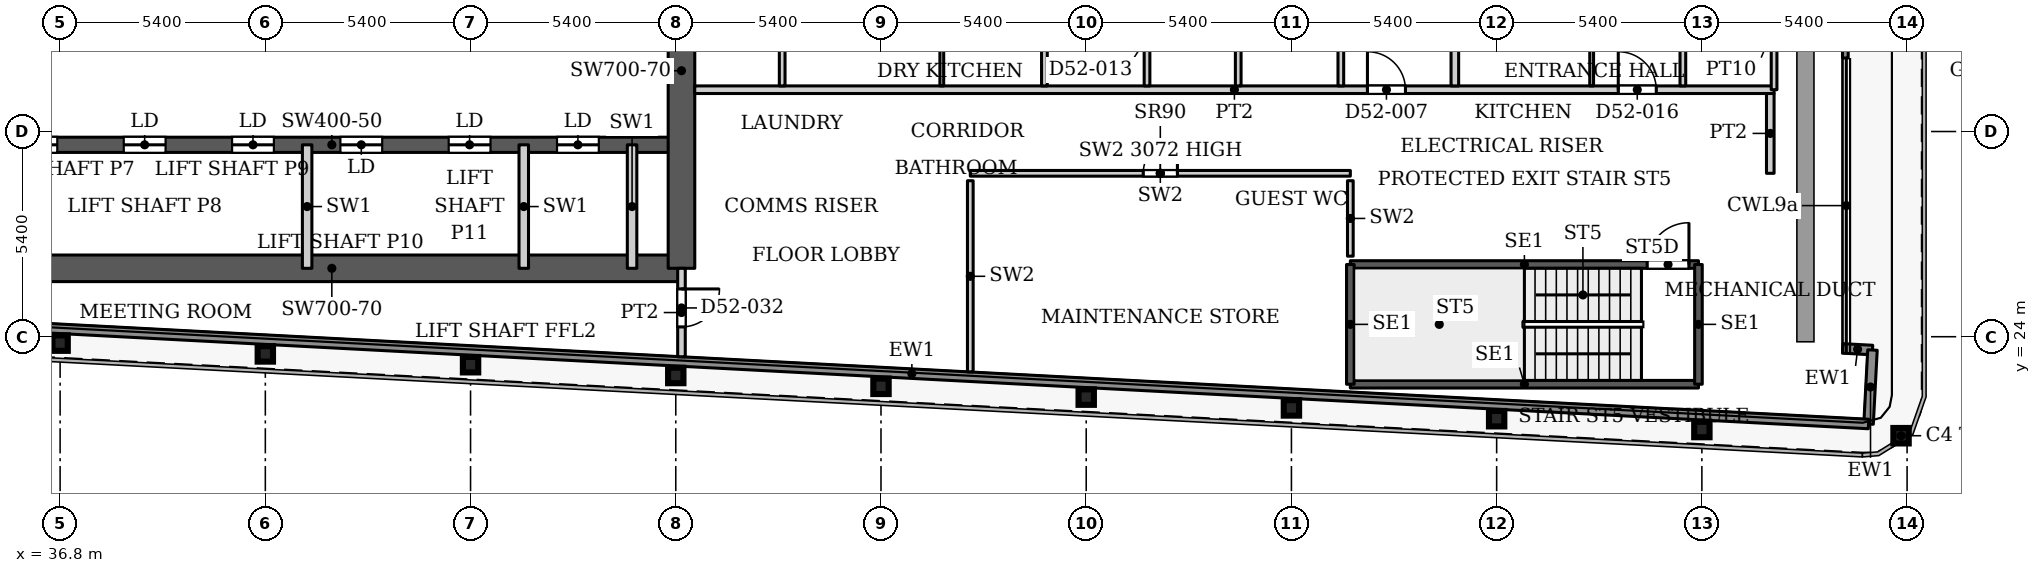
"""IFC4 building model, lengths in metres.
Left out: names, types, materials, properties, quantities, classifications, styles, units other than length and angle.
Written with IfcOpenShell. Run it as: python <this file> out.ifc"""

import sys

from ifc_helpers import new_model, si_unit, direction, frame, frame_2d, origin, origin_2d, place, context, subcontext, project, spatial, rectangle, i_section, extrude, source, transform, mapped, element, fill, save


model = new_model("IFC4")
c1 = context("Model", 3, precision=1e-05, world=origin(), true_north=direction((0.0, 1.0)))
c2 = subcontext(c1, "Body", "Model", "MODEL_VIEW")
j1 = project(units=[si_unit("LENGTHUNIT", "METRE"), si_unit("PLANEANGLEUNIT", "RADIAN")], contexts=[c1])
p1 = place(None, origin())
s1 = spatial("IfcSite", under=j1, at=p1, CompositionType="ELEMENT")
p2 = place(p1, origin())
s2 = spatial("IfcBuilding", under=s1, at=p2, CompositionType="ELEMENT")
p3 = place(p2, frame((0.0, 0.0, 227.9)))
s3 = spatial("IfcBuildingStorey", under=s2, at=p3, CompositionType="ELEMENT", Elevation=227.9)
for number, where, z_axis, x_axis in (
    (1, (85.241, 21.395, 0.0), (0.0, 0.0, 1.0), (1.0, 0.0, 0.0)),
    (2, (80.0, 21.558, 0.0), (0.0, 0.0, 1.0), (1.0, 0.0, 0.0)),
    (3, (74.6, 21.843, 0.0), (0.0, 0.0, 1.0), (1.0, 0.0, 0.0)),
    (4, (69.2, 22.127, 0.0), (0.0, 0.0, 1.0), (1.0, 0.0, 0.0)),
    (5, (63.8, 22.411, 0.0), (0.0, 0.0, 1.0), (1.0, 0.0, 0.0)),
    (6, (58.4, 22.695, 0.0), (0.0, 0.0, 1.0), (1.0, 0.0, 0.0)),
    (7, (53.0, 22.98, 0.0), (0.0, 0.0, 1.0), (1.0, 0.0, 0.0)),
    (8, (47.6, 23.264, 0.0), (0.0, 0.0, 1.0), (1.0, 0.0, 0.0)),
    (9, (42.2, 23.548, 0.0), (0.0, 0.0, 1.0), (1.0, 0.0, 0.0)),
    (10, (36.8, 23.832, 0.0), (0.0, 0.0, 1.0), (1.0, 0.0, 0.0)),
):
    element("IfcColumn", number, at=place(p3, frame(where, z_axis=z_axis, x_axis=x_axis)), inside=s3, PredefinedType="COLUMN", context=c2, shape_type="SweptSolid", body=[
        extrude(i_section(OverallWidth=0.404, OverallDepth=0.407, WebThickness=0.027, FlangeThickness=0.044, FilletRadius=0.012, at=origin_2d()), origin(), (0.0, 0.0, 1.0), 3.9),
    ])
p4 = place(p3, frame((34.75, 25.8, 0.0), z_axis=(0.0, 0.0, 1.0), x_axis=(1.0, 0.0, 0.0)))
e11 = element("IfcWall", 11, at=p4, inside=s3, PredefinedType="SHEAR", context=c2, shape_type="SweptSolid", body=[
    extrude(rectangle(XDim=18.4, YDim=0.7, at=frame_2d((9.2, 0.0))), origin(), (0.0, 0.0, 1.0), 3.9),
])
p5 = place(p3, frame((34.75, 29.05, 0.0), z_axis=(0.0, 0.0, 1.0), x_axis=(1.0, 0.0, 0.0)))
e12 = element("IfcWall", 12, at=p5, inside=s3, PredefinedType="SHEAR", context=c2, shape_type="SweptSolid", body=[
    extrude(rectangle(XDim=18.4, YDim=0.4, at=frame_2d((9.2, 0.0))), origin(), (0.0, 0.0, 1.0), 3.9),
])
p6 = place(p5, frame((0.875, 0.0, 0.0)))
e13 = element("IfcOpeningElement", 13, at=p6, cuts=e12, PredefinedType="OPENING", context=c2, shape_type="SweptSolid", body=[
    extrude(rectangle(XDim=1.1, YDim=2.2, at=frame_2d((0.55, 1.1))), frame((0.0, 0.21, 0.0), z_axis=(0.0, -1.0, 0.0), x_axis=(1.0, 0.0, 0.0)), (0.0, 0.0, 1.0), 0.42),
])
p7 = place(p5, frame((3.725, 0.0, 0.0)))
e14 = element("IfcOpeningElement", 14, at=p7, cuts=e12, PredefinedType="OPENING", context=c2, shape_type="SweptSolid", body=[
    extrude(rectangle(XDim=1.1, YDim=2.2, at=frame_2d((0.55, 1.1))), frame((0.0, 0.21, 0.0), z_axis=(0.0, -1.0, 0.0), x_axis=(1.0, 0.0, 0.0)), (0.0, 0.0, 1.0), 0.42),
])
p8 = place(p5, frame((6.575, 0.0, 0.0)))
e15 = element("IfcOpeningElement", 15, at=p8, cuts=e12, PredefinedType="OPENING", context=c2, shape_type="SweptSolid", body=[
    extrude(rectangle(XDim=1.1, YDim=2.2, at=frame_2d((0.55, 1.1))), frame((0.0, 0.21, 0.0), z_axis=(0.0, -1.0, 0.0), x_axis=(1.0, 0.0, 0.0)), (0.0, 0.0, 1.0), 0.42),
])
p9 = place(p5, frame((9.425, 0.0, 0.0)))
e16 = element("IfcOpeningElement", 16, at=p9, cuts=e12, PredefinedType="OPENING", context=c2, shape_type="SweptSolid", body=[
    extrude(rectangle(XDim=1.1, YDim=2.2, at=frame_2d((0.55, 1.1))), frame((0.0, 0.21, 0.0), z_axis=(0.0, -1.0, 0.0), x_axis=(1.0, 0.0, 0.0)), (0.0, 0.0, 1.0), 0.42),
])
p10 = place(p5, frame((12.275, 0.0, 0.0)))
e17 = element("IfcOpeningElement", 17, at=p10, cuts=e12, PredefinedType="OPENING", context=c2, shape_type="SweptSolid", body=[
    extrude(rectangle(XDim=1.1, YDim=2.2, at=frame_2d((0.55, 1.1))), frame((0.0, 0.21, 0.0), z_axis=(0.0, -1.0, 0.0), x_axis=(1.0, 0.0, 0.0)), (0.0, 0.0, 1.0), 0.42),
])
p11 = place(p5, frame((15.125, 0.0, 0.0)))
e18 = element("IfcOpeningElement", 18, at=p11, cuts=e12, PredefinedType="OPENING", context=c2, shape_type="SweptSolid", body=[
    extrude(rectangle(XDim=1.1, YDim=2.2, at=frame_2d((0.55, 1.1))), frame((0.0, 0.21, 0.0), z_axis=(0.0, -1.0, 0.0), x_axis=(1.0, 0.0, 0.0)), (0.0, 0.0, 1.0), 0.42),
])
p12 = place(p3, frame((53.15, 25.8, 0.0), z_axis=(0.0, 0.0, 1.0), x_axis=(0.0, 1.0, 0.0)))
e19 = element("IfcWall", 19, at=p12, inside=s3, PredefinedType="SHEAR", context=c2, shape_type="SweptSolid", body=[
    extrude(rectangle(XDim=10.4, YDim=0.7, at=frame_2d((5.2, 0.0))), origin(), (0.0, 0.0, 1.0), 3.9),
])
p13 = place(p3, frame((83.775, 33.733, 0.0), z_axis=(0.0, 0.0, 1.0), x_axis=(0.0, -1.0, 0.0)))
e20 = element("IfcWall", 20, at=p13, inside=s3, PredefinedType="SOLIDWALL", context=c2, shape_type="SweptSolid", body=[
    extrude(rectangle(XDim=2.399, YDim=0.15, at=frame_2d((1.199, 0.0))), origin(), (0.0, 0.0, 1.0), 3.75),
])
p14 = place(p13, frame((0.3, 0.0, 0.0)))
e21 = element("IfcOpeningElement", 21, at=p14, cuts=e20, PredefinedType="OPENING", context=c2, shape_type="SweptSolid", body=[
    extrude(rectangle(XDim=1.8, YDim=2.4, at=frame_2d((0.9, 1.2))), frame((0.0, 0.085, 0.0), z_axis=(0.0, -1.0, 0.0), x_axis=(1.0, 0.0, 0.0)), (0.0, 0.0, 1.0), 0.17),
])
p15 = place(p3, frame((83.707, 23.692, 0.0), z_axis=(0.0, 0.0, 1.0), x_axis=(0.998561284263, -0.053622398031, 0.0)))
e22 = element("IfcWall", 22, at=p15, inside=s3, PredefinedType="SOLIDWALL", context=c2, shape_type="SweptSolid", body=[
    extrude(rectangle(XDim=0.783, YDim=0.25, at=frame_2d((0.392, 0.0))), origin(), (0.0, 0.0, 1.0), 3.75),
])
p16 = place(p3, frame((84.489, 23.65, 0.0), z_axis=(0.0, 0.0, 1.0), x_axis=(-0.052841433274, -0.998602915542, 0.0)))
e23 = element("IfcWall", 23, at=p16, inside=s3, PredefinedType="SOLIDWALL", context=c2, shape_type="SweptSolid", body=[
    extrude(rectangle(XDim=1.95, YDim=0.25, at=frame_2d((0.975, 0.0))), origin(), (0.0, 0.0, 1.0), 3.75),
])
p17 = place(p3, frame((84.386, 21.703, 0.0), z_axis=(0.0, 0.0, 1.0), x_axis=(-0.998617508267, 0.05256493302, 0.0)))
e24 = element("IfcWall", 24, at=p17, inside=s3, PredefinedType="SOLIDWALL", context=c2, shape_type="SweptSolid", body=[
    extrude(rectangle(XDim=50.417, YDim=0.25, at=frame_2d((25.208, 0.0))), origin(), (0.0, 0.0, 1.0), 3.75),
])
p18 = place(p3, frame((70.75, 22.75, 0.0), z_axis=(0.0, 0.0, 1.0), x_axis=(1.0, 0.0, 0.0)))
e25 = element("IfcWall", 25, at=p18, inside=s3, PredefinedType="SHEAR", context=c2, shape_type="SweptSolid", body=[
    extrude(rectangle(XDim=9.16, YDim=0.2, at=frame_2d((4.58, 0.0))), origin(), (0.0, 0.0, 1.0), 3.9),
])
p19 = place(p3, frame((70.75, 25.9, 0.0), z_axis=(0.0, 0.0, 1.0), x_axis=(1.0, 0.0, 0.0)))
e26 = element("IfcWall", 26, at=p19, inside=s3, PredefinedType="SHEAR", context=c2, shape_type="SweptSolid", body=[
    extrude(rectangle(XDim=9.16, YDim=0.2, at=frame_2d((4.58, 0.0))), origin(), (0.0, 0.0, 1.0), 3.9),
])
p20 = place(p19, frame((7.81, 0.0, 0.0)))
e27 = element("IfcOpeningElement", 27, at=p20, cuts=e26, PredefinedType="OPENING", context=c2, shape_type="SweptSolid", body=[
    extrude(rectangle(XDim=1.1, YDim=2.2, at=frame_2d((0.55, 1.1))), frame((0.0, 0.11, 0.0), z_axis=(0.0, -1.0, 0.0), x_axis=(1.0, 0.0, 0.0)), (0.0, 0.0, 1.0), 0.22),
])
for number, where, z_axis, x_axis in (
    (28, (70.75, 22.75, 0.0), (0.0, 0.0, 1.0), (0.0, 1.0, 0.0)),
    (29, (79.91, 22.75, 0.0), (0.0, 0.0, 1.0), (0.0, 1.0, 0.0)),
):
    element("IfcWall", number, at=place(p3, frame(where, z_axis=z_axis, x_axis=x_axis)), inside=s3, PredefinedType="SHEAR", context=c2, shape_type="SweptSolid", body=[
        extrude(rectangle(XDim=3.15, YDim=0.2, at=frame_2d((1.575, 0.0))), origin(), (0.0, 0.0, 1.0), 3.9),
    ])
for number, where, z_axis, x_axis in (
    (30, (43.3, 25.8, 0.0), (0.0, 0.0, 1.0), (0.0, 1.0, 0.0)),
    (31, (49.0, 25.8, 0.0), (0.0, 0.0, 1.0), (0.0, 1.0, 0.0)),
    (32, (51.85, 25.8, 0.0), (0.0, 0.0, 1.0), (0.0, 1.0, 0.0)),
):
    element("IfcWall", number, at=place(p3, frame(where, z_axis=z_axis, x_axis=x_axis)), inside=s3, PredefinedType="PARTITIONING", context=c2, shape_type="SweptSolid", body=[
        extrude(rectangle(XDim=3.25, YDim=0.25, at=frame_2d((1.625, 0.0))), origin(), (0.0, 0.0, 1.0), 3.9),
    ])
p21 = place(p3, frame((60.75, 28.3, 0.0), z_axis=(0.0, 0.0, 1.0), x_axis=(1.0, 0.0, 0.0)))
e33 = element("IfcWall", 33, at=p21, inside=s3, PredefinedType="PARTITIONING", context=c2, shape_type="SweptSolid", body=[
    extrude(rectangle(XDim=10.0, YDim=0.15, at=frame_2d((5.0, 0.0))), origin(), (0.0, 0.0, 1.0), 3.072),
])
p22 = place(p21, frame((4.55, 0.0, 0.0)))
e34 = element("IfcOpeningElement", 34, at=p22, cuts=e33, PredefinedType="OPENING", context=c2, shape_type="SweptSolid", body=[
    extrude(rectangle(XDim=0.9, YDim=2.2, at=frame_2d((0.45, 1.1))), frame((0.0, 0.085, 0.0), z_axis=(0.0, -1.0, 0.0), x_axis=(1.0, 0.0, 0.0)), (0.0, 0.0, 1.0), 0.17),
])
p23 = place(p3, frame((60.75, 23.075, 0.0), z_axis=(0.0, 0.0, 1.0), x_axis=(0.0, 1.0, 0.0)))
e35 = element("IfcWall", 35, at=p23, inside=s3, PredefinedType="PARTITIONING", context=c2, shape_type="SweptSolid", body=[
    extrude(rectangle(XDim=5.03, YDim=0.15, at=frame_2d((2.515, 0.0))), origin(), (0.0, 0.0, 1.0), 3.9),
])
p24 = place(p3, frame((70.75, 26.12, 0.0), z_axis=(0.0, 0.0, 1.0), x_axis=(0.0, 1.0, 0.0)))
e36 = element("IfcWall", 36, at=p24, inside=s3, PredefinedType="PARTITIONING", context=c2, shape_type="SweptSolid", body=[
    extrude(rectangle(XDim=1.985, YDim=0.15, at=frame_2d((0.992, 0.0))), origin(), (0.0, 0.0, 1.0), 3.9),
])
p25 = place(p3, frame((53.15, 23.472, 0.0), z_axis=(0.0, 0.0, 1.0), x_axis=(0.0, 1.0, 0.0)))
e37 = element("IfcWall", 37, at=p25, inside=s3, PredefinedType="PARTITIONING", context=c2, shape_type="SweptSolid", body=[
    extrude(rectangle(XDim=2.328, YDim=0.2, at=frame_2d((1.164, 0.0))), origin(), (0.0, 0.0, 1.0), 3.6),
])
p26 = place(p25, frame((0.785, 0.0, 0.0)))
e38 = element("IfcOpeningElement", 38, at=p26, cuts=e37, PredefinedType="OPENING", context=c2, shape_type="SweptSolid", body=[
    extrude(rectangle(XDim=1.0, YDim=2.1, at=frame_2d((0.5, 1.05))), frame((0.0, 0.11, 0.0), z_axis=(0.0, -1.0, 0.0), x_axis=(1.0, 0.0, 0.0)), (0.0, 0.0, 1.0), 0.22),
])
p27 = place(p3, frame((53.499, 30.5, 0.0), z_axis=(0.0, 0.0, 1.0), x_axis=(1.0, 0.0, 0.0)))
e39 = element("IfcWall", 39, at=p27, inside=s3, PredefinedType="PARTITIONING", context=c2, shape_type="SweptSolid", body=[
    extrude(rectangle(XDim=28.401, YDim=0.2, at=frame_2d((14.2, 0.0))), origin(), (0.0, 0.0, 1.0), 3.6),
])
p28 = place(p27, frame((17.701, 0.0, 0.0)))
e40 = element("IfcOpeningElement", 40, at=p28, cuts=e39, PredefinedType="OPENING", context=c2, shape_type="SweptSolid", body=[
    extrude(rectangle(XDim=1.0, YDim=2.1, at=frame_2d((0.5, 1.05))), frame((0.0, 0.11, 0.0), z_axis=(0.0, -1.0, 0.0), x_axis=(1.0, 0.0, 0.0)), (0.0, 0.0, 1.0), 0.22),
])
p29 = place(p27, frame((24.301, 0.0, 0.0)))
e41 = element("IfcOpeningElement", 41, at=p29, cuts=e39, PredefinedType="OPENING", context=c2, shape_type="SweptSolid", body=[
    extrude(rectangle(XDim=1.0, YDim=2.1, at=frame_2d((0.5, 1.05))), frame((0.0, 0.11, 0.0), z_axis=(0.0, -1.0, 0.0), x_axis=(1.0, 0.0, 0.0)), (0.0, 0.0, 1.0), 0.22),
])
p30 = place(p3, frame((55.8, 30.6, 0.0), z_axis=(0.0, 0.0, 1.0), x_axis=(0.0, 1.0, 0.0)))
e42 = element("IfcWall", 42, at=p30, inside=s3, PredefinedType="PARTITIONING", context=c2, shape_type="SweptSolid", body=[
    extrude(rectangle(XDim=3.025, YDim=0.15, at=frame_2d((1.512, 0.0))), origin(), (0.0, 0.0, 1.0), 3.6),
])
p31 = place(p3, frame((60.0, 30.6, 0.0), z_axis=(0.0, 0.0, 1.0), x_axis=(0.0, 1.0, 0.0)))
e43 = element("IfcWall", 43, at=p31, inside=s3, PredefinedType="PARTITIONING", context=c2, shape_type="SweptSolid", body=[
    extrude(rectangle(XDim=3.025, YDim=0.1, at=frame_2d((1.512, 0.0))), origin(), (0.0, 0.0, 1.0), 3.6),
])
for number, where, z_axis, x_axis in (
    (44, (62.7, 30.6, 0.0), (0.0, 0.0, 1.0), (0.0, 1.0, 0.0)),
    (45, (65.4, 30.6, 0.0), (0.0, 0.0, 1.0), (0.0, 1.0, 0.0)),
    (46, (67.8, 30.6, 0.0), (0.0, 0.0, 1.0), (0.0, 1.0, 0.0)),
    (47, (70.5, 30.6, 0.0), (0.0, 0.0, 1.0), (0.0, 1.0, 0.0)),
):
    element("IfcWall", number, at=place(p3, frame(where, z_axis=z_axis, x_axis=x_axis)), inside=s3, PredefinedType="PARTITIONING", context=c2, shape_type="SweptSolid", body=[
        extrude(rectangle(XDim=3.025, YDim=0.15, at=frame_2d((1.512, 0.0))), origin(), (0.0, 0.0, 1.0), 3.6),
    ])
p32 = place(p3, frame((73.5, 30.6, 0.0), z_axis=(0.0, 0.0, 1.0), x_axis=(0.0, 1.0, 0.0)))
e48 = element("IfcWall", 48, at=p32, inside=s3, PredefinedType="PARTITIONING", context=c2, shape_type="SweptSolid", body=[
    extrude(rectangle(XDim=13.3, YDim=0.2, at=frame_2d((6.65, 0.0))), origin(), (0.0, 0.0, 1.0), 3.6),
])
p33 = place(p3, frame((77.1, 30.6, 0.0), z_axis=(0.0, 0.0, 1.0), x_axis=(0.0, 1.0, 0.0)))
e49 = element("IfcWall", 49, at=p33, inside=s3, PredefinedType="PARTITIONING", context=c2, shape_type="SweptSolid", body=[
    extrude(rectangle(XDim=3.05, YDim=0.1, at=frame_2d((1.525, 0.0))), origin(), (0.0, 0.0, 1.0), 3.6),
])
p34 = place(p3, frame((79.5, 30.6, 0.0), z_axis=(0.0, 0.0, 1.0), x_axis=(0.0, 1.0, 0.0)))
e50 = element("IfcWall", 50, at=p34, inside=s3, PredefinedType="PARTITIONING", context=c2, shape_type="SweptSolid", body=[
    extrude(rectangle(XDim=3.175, YDim=0.15, at=frame_2d((1.587, 0.0))), origin(), (0.0, 0.0, 1.0), 3.6),
])
p35 = place(p3, frame((81.8, 28.3, 0.0), z_axis=(0.0, 0.0, 1.0), x_axis=(0.0, 1.0, 0.0)))
e51 = element("IfcWall", 51, at=p35, inside=s3, PredefinedType="PARTITIONING", context=c2, shape_type="SweptSolid", body=[
    extrude(rectangle(XDim=2.1, YDim=0.2, at=frame_2d((1.05, 0.0))), origin(), (0.0, 0.0, 1.0), 3.6),
])
p36 = place(p3, frame((81.9, 30.5, 0.0), z_axis=(0.0, 0.0, 1.0), x_axis=(0.0, 1.0, 0.0)))
e52 = element("IfcWall", 52, at=p36, inside=s3, PredefinedType="PARTITIONING", context=c2, shape_type="SweptSolid", body=[
    extrude(rectangle(XDim=3.275, YDim=0.15, at=frame_2d((1.637, 0.0))), origin(), (0.0, 0.0, 1.0), 3.6),
])
m1 = source(origin(), c2, "Body", "SweptSolid", [
    extrude(rectangle(XDim=1.1, YDim=2.2, at=frame_2d((0.55, 1.1))), frame((0.0, 0.025, 0.0), z_axis=(0.0, -1.0, 0.0), x_axis=(1.0, 0.0, 0.0)), (0.0, 0.0, 1.0), 0.05),
])
p37 = place(p6, origin())
e53 = element("IfcDoor", 53, at=p37, inside=s3, OperationType="SLIDING_TO_LEFT", PredefinedType="DOOR", context=c2, shape_type="MappedRepresentation", body=[
    mapped(m1, transform((0.0, 0.0, 0.0), x_axis=(1.0, 0.0, 0.0), y_axis=(0.0, 1.0, 0.0), z_axis=(0.0, 0.0, 1.0), scale=1.0)),
])
fill(e13, e53)
p38 = place(p7, origin())
e54 = element("IfcDoor", 54, at=p38, inside=s3, OperationType="SLIDING_TO_LEFT", PredefinedType="DOOR", context=c2, shape_type="MappedRepresentation", body=[
    mapped(m1, transform((0.0, 0.0, 0.0), x_axis=(1.0, 0.0, 0.0), y_axis=(0.0, 1.0, 0.0), z_axis=(0.0, 0.0, 1.0), scale=1.0)),
])
fill(e14, e54)
p39 = place(p8, origin())
e55 = element("IfcDoor", 55, at=p39, inside=s3, OperationType="SLIDING_TO_LEFT", PredefinedType="DOOR", context=c2, shape_type="MappedRepresentation", body=[
    mapped(m1, transform((0.0, 0.0, 0.0), x_axis=(1.0, 0.0, 0.0), y_axis=(0.0, 1.0, 0.0), z_axis=(0.0, 0.0, 1.0), scale=1.0)),
])
fill(e15, e55)
p40 = place(p9, origin())
e56 = element("IfcDoor", 56, at=p40, inside=s3, OperationType="SLIDING_TO_LEFT", PredefinedType="DOOR", context=c2, shape_type="MappedRepresentation", body=[
    mapped(m1, transform((0.0, 0.0, 0.0), x_axis=(1.0, 0.0, 0.0), y_axis=(0.0, 1.0, 0.0), z_axis=(0.0, 0.0, 1.0), scale=1.0)),
])
fill(e16, e56)
p41 = place(p10, origin())
e57 = element("IfcDoor", 57, at=p41, inside=s3, OperationType="SLIDING_TO_LEFT", PredefinedType="DOOR", context=c2, shape_type="MappedRepresentation", body=[
    mapped(m1, transform((0.0, 0.0, 0.0), x_axis=(1.0, 0.0, 0.0), y_axis=(0.0, 1.0, 0.0), z_axis=(0.0, 0.0, 1.0), scale=1.0)),
])
fill(e17, e57)
p42 = place(p11, origin())
e58 = element("IfcDoor", 58, at=p42, inside=s3, OperationType="SLIDING_TO_LEFT", PredefinedType="DOOR", context=c2, shape_type="MappedRepresentation", body=[
    mapped(m1, transform((0.0, 0.0, 0.0), x_axis=(1.0, 0.0, 0.0), y_axis=(0.0, 1.0, 0.0), z_axis=(0.0, 0.0, 1.0), scale=1.0)),
])
fill(e18, e58)
m2 = source(origin(), c2, "Body", "SweptSolid", [
    extrude(rectangle(XDim=0.9, YDim=2.2, at=frame_2d((0.45, 1.1))), frame((0.0, 0.025, 0.0), z_axis=(0.0, -1.0, 0.0), x_axis=(1.0, 0.0, 0.0)), (0.0, 0.0, 1.0), 0.05),
])
p43 = place(p22, origin())
e59 = element("IfcDoor", 59, at=p43, inside=s3, OperationType="SINGLE_SWING_LEFT", PredefinedType="DOOR", context=c2, shape_type="MappedRepresentation", body=[
    mapped(m2, transform((0.0, 0.0, 0.0), x_axis=(1.0, 0.0, 0.0), y_axis=(0.0, 1.0, 0.0), z_axis=(0.0, 0.0, 1.0), scale=1.0)),
])
fill(e34, e59)
m3 = source(origin(), c2, "Body", "SweptSolid", [
    extrude(rectangle(XDim=1.1, YDim=2.2, at=frame_2d((0.55, 1.1))), frame((0.0, 0.025, 0.0), z_axis=(0.0, -1.0, 0.0), x_axis=(1.0, 0.0, 0.0)), (0.0, 0.0, 1.0), 0.05),
])
p44 = place(p20, origin())
e60 = element("IfcDoor", 60, at=p44, inside=s3, OperationType="SINGLE_SWING_LEFT", PredefinedType="DOOR", context=c2, shape_type="MappedRepresentation", body=[
    mapped(m3, transform((0.0, 0.0, 0.0), x_axis=(1.0, 0.0, 0.0), y_axis=(0.0, 1.0, 0.0), z_axis=(0.0, 0.0, 1.0), scale=1.0)),
])
fill(e27, e60)
m4 = source(origin(), c2, "Body", "SweptSolid", [
    extrude(rectangle(XDim=1.0, YDim=2.1, at=frame_2d((0.5, 1.05))), frame((0.0, 0.025, 0.0), z_axis=(0.0, -1.0, 0.0), x_axis=(1.0, 0.0, 0.0)), (0.0, 0.0, 1.0), 0.05),
])
p45 = place(p28, origin())
e61 = element("IfcDoor", 61, at=p45, inside=s3, OperationType="SINGLE_SWING_LEFT", PredefinedType="DOOR", context=c2, shape_type="MappedRepresentation", body=[
    mapped(m4, transform((0.0, 0.0, 0.0), x_axis=(1.0, 0.0, 0.0), y_axis=(0.0, 1.0, 0.0), z_axis=(0.0, 0.0, 1.0), scale=1.0)),
])
fill(e40, e61)
p46 = place(p29, origin())
e62 = element("IfcDoor", 62, at=p46, inside=s3, OperationType="SINGLE_SWING_LEFT", PredefinedType="DOOR", context=c2, shape_type="MappedRepresentation", body=[
    mapped(m4, transform((0.0, 0.0, 0.0), x_axis=(1.0, 0.0, 0.0), y_axis=(0.0, 1.0, 0.0), z_axis=(0.0, 0.0, 1.0), scale=1.0)),
])
fill(e41, e62)
m5 = source(origin(), c2, "Body", "SweptSolid", [
    extrude(rectangle(XDim=1.0, YDim=2.1, at=frame_2d((0.5, 1.05))), frame((0.0, 0.025, 0.0), z_axis=(0.0, -1.0, 0.0), x_axis=(1.0, 0.0, 0.0)), (0.0, 0.0, 1.0), 0.05),
])
p47 = place(p26, origin())
e63 = element("IfcDoor", 63, at=p47, inside=s3, OperationType="SINGLE_SWING_RIGHT", PredefinedType="DOOR", context=c2, shape_type="MappedRepresentation", body=[
    mapped(m5, transform((0.0, 0.0, 0.0), x_axis=(1.0, 0.0, 0.0), y_axis=(0.0, 1.0, 0.0), z_axis=(0.0, 0.0, 1.0), scale=1.0)),
])
fill(e38, e63)
save(model, sys.argv[1])
